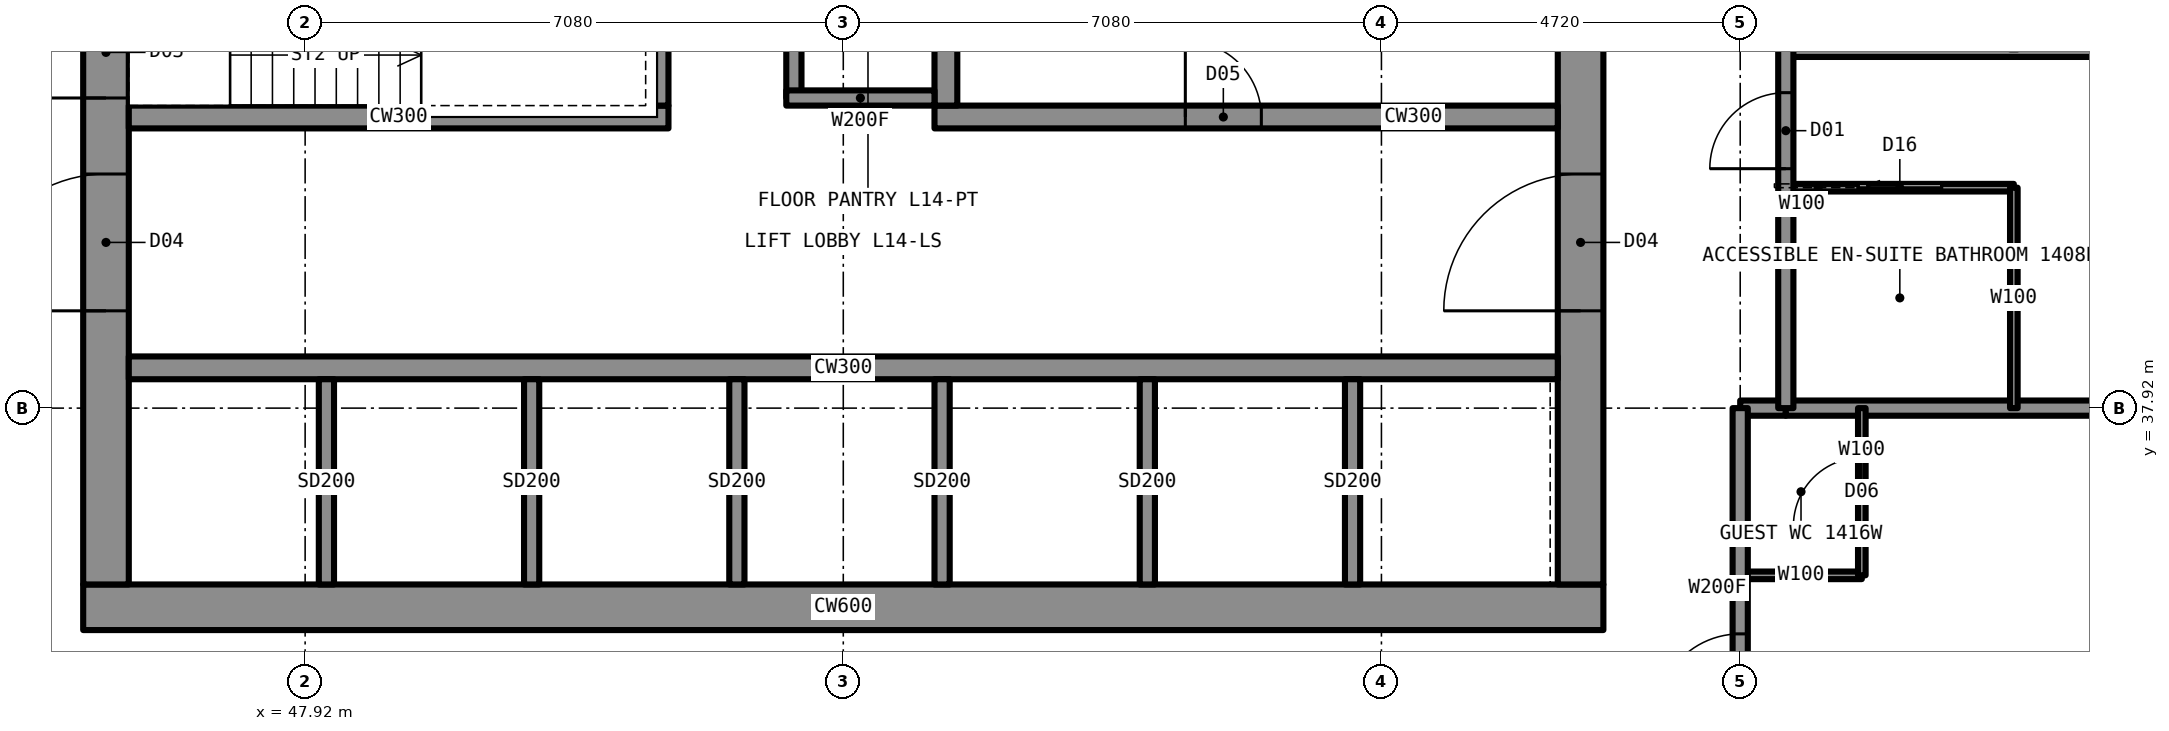
"""IFC4 building model, lengths in metres.
Left out: names, types, materials, properties, quantities, classifications, styles, units other than length and angle.
Written with IfcOpenShell. Run it as: python <this file> out.ifc"""

import sys

from ifc_helpers import new_model, si_unit, direction, frame, frame_2d, origin, place, context, subcontext, project, spatial, rectangle, extrude, element, fill, save


model = new_model("IFC4")
c1 = context("Model", 3, precision=1e-05, world=origin(), true_north=direction((0.0, 1.0)))
c2 = subcontext(c1, "Body", "Model", "MODEL_VIEW")
j1 = project(units=[si_unit("LENGTHUNIT", "METRE"), si_unit("PLANEANGLEUNIT", "RADIAN")], contexts=[c1])
p1 = place(None, origin())
s1 = spatial("IfcSite", under=j1, at=p1, CompositionType="ELEMENT")
p2 = place(p1, origin())
s2 = spatial("IfcBuilding", under=s1, at=p2, CompositionType="ELEMENT")
p3 = place(p2, frame((0.0, 0.0, 49.5)))
s3 = spatial("IfcBuildingStorey", under=s2, at=p3, CompositionType="ELEMENT", Elevation=49.5)
p4 = place(p3, frame((45.0, 35.3, 0.0), z_axis=(0.0, 0.0, 1.0), x_axis=(1.0, 0.0, 0.0)))
e1 = element("IfcWall", 1, at=p4, inside=s3, PredefinedType="SHEAR", context=c2, shape_type="SweptSolid", body=[
    extrude(rectangle(XDim=20.0, YDim=0.6, at=frame_2d((10.0, 0.0))), origin(), (0.0, 0.0, 1.0), 3.5),
])
p5 = place(p3, frame((64.7, 35.6, 0.0), z_axis=(0.0, 0.0, 1.0), x_axis=(0.0, 1.0, 0.0)))
e2 = element("IfcWall", 2, at=p5, inside=s3, PredefinedType="SHEAR", context=c2, shape_type="SweptSolid", body=[
    extrude(rectangle(XDim=18.8, YDim=0.6, at=frame_2d((9.4, 0.0))), origin(), (0.0, 0.0, 1.0), 3.5),
])
p6 = place(p5, frame((13.4, 0.0, 0.0)))
e3 = element("IfcOpeningElement", 3, at=p6, cuts=e2, PredefinedType="OPENING", context=c2, shape_type="SweptSolid", body=[
    extrude(rectangle(XDim=1.8, YDim=2.2, at=frame_2d((0.9, 1.1))), frame((0.0, 0.31, 0.0), z_axis=(0.0, -1.0, 0.0), x_axis=(1.0, 0.0, 0.0)), (0.0, 0.0, 1.0), 0.62),
])
p7 = place(p5, frame((3.6, 0.0, 0.0)))
e4 = element("IfcOpeningElement", 4, at=p7, cuts=e2, PredefinedType="OPENING", context=c2, shape_type="SweptSolid", body=[
    extrude(rectangle(XDim=1.8, YDim=2.2, at=frame_2d((0.9, 1.1))), frame((0.0, 0.31, 0.0), z_axis=(0.0, -1.0, 0.0), x_axis=(1.0, 0.0, 0.0)), (0.0, 0.0, 1.0), 0.62),
])
p8 = place(p3, frame((45.3, 35.6, 0.0), z_axis=(0.0, 0.0, 1.0), x_axis=(0.0, 1.0, 0.0)))
e5 = element("IfcWall", 5, at=p8, inside=s3, PredefinedType="SHEAR", context=c2, shape_type="SweptSolid", body=[
    extrude(rectangle(XDim=18.8, YDim=0.6, at=frame_2d((9.4, 0.0))), origin(), (0.0, 0.0, 1.0), 3.5),
])
p9 = place(p8, frame((13.4, 0.0, 0.0)))
e6 = element("IfcOpeningElement", 6, at=p9, cuts=e5, PredefinedType="OPENING", context=c2, shape_type="SweptSolid", body=[
    extrude(rectangle(XDim=1.8, YDim=2.2, at=frame_2d((0.9, 1.1))), frame((0.0, 0.31, 0.0), z_axis=(0.0, -1.0, 0.0), x_axis=(1.0, 0.0, 0.0)), (0.0, 0.0, 1.0), 0.62),
])
p10 = place(p8, frame((3.6, 0.0, 0.0)))
e7 = element("IfcOpeningElement", 7, at=p10, cuts=e5, PredefinedType="OPENING", context=c2, shape_type="SweptSolid", body=[
    extrude(rectangle(XDim=1.8, YDim=2.2, at=frame_2d((0.9, 1.1))), frame((0.0, 0.31, 0.0), z_axis=(0.0, -1.0, 0.0), x_axis=(1.0, 0.0, 0.0)), (0.0, 0.0, 1.0), 0.62),
])
p11 = place(p8, frame((6.4, 0.0, 0.0)))
e8 = element("IfcOpeningElement", 8, at=p11, cuts=e5, PredefinedType="OPENING", context=c2, shape_type="SweptSolid", body=[
    extrude(rectangle(XDim=1.2, YDim=2.2, at=frame_2d((0.6, 1.1))), frame((0.0, 0.31, 0.0), z_axis=(0.0, -1.0, 0.0), x_axis=(1.0, 0.0, 0.0)), (0.0, 0.0, 1.0), 0.62),
])
p12 = place(p3, frame((45.6, 38.45, 0.0), z_axis=(0.0, 0.0, 1.0), x_axis=(1.0, 0.0, 0.0)))
e9 = element("IfcWall", 9, at=p12, inside=s3, PredefinedType="SHEAR", context=c2, shape_type="SweptSolid", body=[
    extrude(rectangle(XDim=18.8, YDim=0.3, at=frame_2d((9.4, 0.0))), origin(), (0.0, 0.0, 1.0), 3.5),
])
p13 = place(p3, frame((45.6, 41.75, 0.0), z_axis=(0.0, 0.0, 1.0), x_axis=(1.0, 0.0, 0.0)))
e10 = element("IfcWall", 10, at=p13, inside=s3, PredefinedType="SHEAR", context=c2, shape_type="SweptSolid", body=[
    extrude(rectangle(XDim=7.1, YDim=0.3, at=frame_2d((3.55, 0.0))), origin(), (0.0, 0.0, 1.0), 3.5),
])
p14 = place(p3, frame((56.2, 41.75, 0.0), z_axis=(0.0, 0.0, 1.0), x_axis=(1.0, 0.0, 0.0)))
e11 = element("IfcWall", 11, at=p14, inside=s3, PredefinedType="SHEAR", context=c2, shape_type="SweptSolid", body=[
    extrude(rectangle(XDim=8.2, YDim=0.3, at=frame_2d((4.1, 0.0))), origin(), (0.0, 0.0, 1.0), 3.5),
])
p15 = place(p14, frame((3.3, 0.0, 0.0)))
e12 = element("IfcOpeningElement", 12, at=p15, cuts=e11, PredefinedType="OPENING", context=c2, shape_type="SweptSolid", body=[
    extrude(rectangle(XDim=1.0, YDim=2.1, at=frame_2d((0.5, 1.05))), frame((0.0, 0.16, 0.0), z_axis=(0.0, -1.0, 0.0), x_axis=(1.0, 0.0, 0.0)), (0.0, 0.0, 1.0), 0.32),
])
p16 = place(p3, frame((52.55, 41.9, 0.0), z_axis=(0.0, 0.0, 1.0), x_axis=(0.0, 1.0, 0.0)))
e13 = element("IfcWall", 13, at=p16, inside=s3, PredefinedType="SHEAR", context=c2, shape_type="SweptSolid", body=[
    extrude(rectangle(XDim=6.2, YDim=0.3, at=frame_2d((3.1, 0.0))), origin(), (0.0, 0.0, 1.0), 3.5),
])
p17 = place(p16, frame((4.125, 0.0, 0.0)))
e14 = element("IfcOpeningElement", 14, at=p17, cuts=e13, PredefinedType="OPENING", context=c2, shape_type="SweptSolid", body=[
    extrude(rectangle(XDim=1.2, YDim=2.2, at=frame_2d((0.6, 1.1))), frame((0.0, 0.16, 0.0), z_axis=(0.0, -1.0, 0.0), x_axis=(1.0, 0.0, 0.0)), (0.0, 0.0, 1.0), 0.32),
])
p18 = place(p3, frame((56.35, 41.9, 0.0), z_axis=(0.0, 0.0, 1.0), x_axis=(0.0, 1.0, 0.0)))
e15 = element("IfcWall", 15, at=p18, inside=s3, PredefinedType="SHEAR", context=c2, shape_type="SweptSolid", body=[
    extrude(rectangle(XDim=9.5, YDim=0.3, at=frame_2d((4.75, 0.0))), origin(), (0.0, 0.0, 1.0), 3.5),
])
p19 = place(p18, frame((7.1, 0.0, 0.0)))
e16 = element("IfcOpeningElement", 16, at=p19, cuts=e15, PredefinedType="OPENING", context=c2, shape_type="SweptSolid", body=[
    extrude(rectangle(XDim=1.8, YDim=2.2, at=frame_2d((0.9, 1.1))), frame((0.0, 0.16, 0.0), z_axis=(0.0, -1.0, 0.0), x_axis=(1.0, 0.0, 0.0)), (0.0, 0.0, 1.0), 0.32),
])
p20 = place(p3, frame((67.4, 42.64, 0.0), z_axis=(0.0, 0.0, 1.0), x_axis=(1.0, 0.0, 0.0)))
e17 = element("IfcWall", 17, at=p20, inside=s3, PredefinedType="PARTITIONING", context=c2, shape_type="SweptSolid", body=[
    extrude(rectangle(XDim=9.3, YDim=0.2, at=frame_2d((4.65, 0.0))), origin(), (0.0, 0.0, 1.0), 2.723),
])
p21 = place(p3, frame((67.4, 40.82, 0.0), z_axis=(0.0, 0.0, 1.0), x_axis=(1.0, 0.0, 0.0)))
e18 = element("IfcWall", 18, at=p21, inside=s3, PredefinedType="PARTITIONING", context=c2, shape_type="SweptSolid", body=[
    extrude(rectangle(XDim=3.0, YDim=0.1, at=frame_2d((1.5, 0.0))), origin(), (0.0, 0.0, 1.0), 3.33),
])
p22 = place(p21, frame((0.95, 0.0, 0.0)))
e19 = element("IfcOpeningElement", 19, at=p22, cuts=e18, PredefinedType="OPENING", context=c2, shape_type="SweptSolid", body=[
    extrude(rectangle(XDim=1.1, YDim=2.1, at=frame_2d((0.55, 1.05))), frame((0.0, 0.06, 0.0), z_axis=(0.0, -1.0, 0.0), x_axis=(1.0, 0.0, 0.0)), (0.0, 0.0, 1.0), 0.12),
])
p23 = place(p3, frame((66.8, 37.92, 0.0), z_axis=(0.0, 0.0, 1.0), x_axis=(1.0, 0.0, 0.0)))
e20 = element("IfcWall", 20, at=p23, inside=s3, PredefinedType="PARTITIONING", context=c2, shape_type="SweptSolid", body=[
    extrude(rectangle(XDim=0.6, YDim=0.2, at=frame_2d((0.3, 0.0))), origin(), (0.0, 0.0, 1.0), 2.573),
])
p24 = place(p3, frame((67.4, 37.92, 0.0), z_axis=(0.0, 0.0, 1.0), x_axis=(1.0, 0.0, 0.0)))
e21 = element("IfcWall", 21, at=p24, inside=s3, PredefinedType="PARTITIONING", context=c2, shape_type="SweptSolid", body=[
    extrude(rectangle(XDim=9.3, YDim=0.2, at=frame_2d((4.65, 0.0))), origin(), (0.0, 0.0, 1.0), 2.573),
])
p25 = place(p3, frame((66.8, 35.72, 0.0), z_axis=(0.0, 0.0, 1.0), x_axis=(1.0, 0.0, 0.0)))
e22 = element("IfcWall", 22, at=p25, inside=s3, PredefinedType="PARTITIONING", context=c2, shape_type="SweptSolid", body=[
    extrude(rectangle(XDim=1.6, YDim=0.1, at=frame_2d((0.8, 0.0))), origin(), (0.0, 0.0, 1.0), 2.723),
])
p26 = place(p3, frame((66.8, 33.2, 0.0), z_axis=(0.0, 0.0, 1.0), x_axis=(0.0, 1.0, 0.0)))
e23 = element("IfcWall", 23, at=p26, inside=s3, PredefinedType="PARTITIONING", context=c2, shape_type="SweptSolid", body=[
    extrude(rectangle(XDim=4.72, YDim=0.2, at=frame_2d((2.36, 0.0))), origin(), (0.0, 0.0, 1.0), 3.33),
])
p27 = place(p26, frame((0.65, 0.0, 0.0)))
e24 = element("IfcOpeningElement", 24, at=p27, cuts=e23, PredefinedType="OPENING", context=c2, shape_type="SweptSolid", body=[
    extrude(rectangle(XDim=1.1, YDim=2.2, at=frame_2d((0.55, 1.1))), frame((0.0, 0.11, 0.0), z_axis=(0.0, -1.0, 0.0), x_axis=(1.0, 0.0, 0.0)), (0.0, 0.0, 1.0), 0.22),
])
p28 = place(p3, frame((67.4, 37.92, 0.0), z_axis=(0.0, 0.0, 1.0), x_axis=(0.0, 1.0, 0.0)))
e25 = element("IfcWall", 25, at=p28, inside=s3, PredefinedType="PARTITIONING", context=c2, shape_type="SweptSolid", body=[
    extrude(rectangle(XDim=14.16, YDim=0.2, at=frame_2d((7.08, 0.0))), origin(), (0.0, 0.0, 1.0), 3.33),
])
p29 = place(p28, frame((3.15, 0.0, 0.0)))
e26 = element("IfcOpeningElement", 26, at=p29, cuts=e25, PredefinedType="OPENING", context=c2, shape_type="SweptSolid", body=[
    extrude(rectangle(XDim=1.0, YDim=2.2, at=frame_2d((0.5, 1.1))), frame((0.0, 0.11, 0.0), z_axis=(0.0, -1.0, 0.0), x_axis=(1.0, 0.0, 0.0)), (0.0, 0.0, 1.0), 0.22),
])
p30 = place(p28, frame((7.72, 0.0, 0.0)))
e27 = element("IfcOpeningElement", 27, at=p30, cuts=e25, PredefinedType="OPENING", context=c2, shape_type="SweptSolid", body=[
    extrude(rectangle(XDim=1.0, YDim=2.2, at=frame_2d((0.5, 1.1))), frame((0.0, 0.11, 0.0), z_axis=(0.0, -1.0, 0.0), x_axis=(1.0, 0.0, 0.0)), (0.0, 0.0, 1.0), 0.22),
])
p31 = place(p3, frame((68.4, 35.72, 0.0), z_axis=(0.0, 0.0, 1.0), x_axis=(0.0, 1.0, 0.0)))
e28 = element("IfcWall", 28, at=p31, inside=s3, PredefinedType="PARTITIONING", context=c2, shape_type="SweptSolid", body=[
    extrude(rectangle(XDim=2.2, YDim=0.1, at=frame_2d((1.1, 0.0))), origin(), (0.0, 0.0, 1.0), 3.33),
])
p32 = place(p31, frame((0.65, 0.0, 0.0)))
e29 = element("IfcOpeningElement", 29, at=p32, cuts=e28, PredefinedType="OPENING", context=c2, shape_type="SweptSolid", body=[
    extrude(rectangle(XDim=0.9, YDim=2.1, at=frame_2d((0.45, 1.05))), frame((0.0, 0.06, 0.0), z_axis=(0.0, -1.0, 0.0), x_axis=(1.0, 0.0, 0.0)), (0.0, 0.0, 1.0), 0.12),
])
p33 = place(p3, frame((70.4, 37.92, 0.0), z_axis=(0.0, 0.0, 1.0), x_axis=(0.0, 1.0, 0.0)))
e30 = element("IfcWall", 30, at=p33, inside=s3, PredefinedType="PARTITIONING", context=c2, shape_type="SweptSolid", body=[
    extrude(rectangle(XDim=2.9, YDim=0.1, at=frame_2d((1.45, 0.0))), origin(), (0.0, 0.0, 1.0), 3.33),
])
p34 = place(p3, frame((54.65, 42.0, 0.0), z_axis=(0.0, 0.0, 1.0), x_axis=(0.0, 1.0, 0.0)))
e31 = element("IfcWall", 31, at=p34, inside=s3, PredefinedType="PARTITIONING", context=c2, shape_type="SweptSolid", body=[
    extrude(rectangle(XDim=1.3, YDim=0.2, at=frame_2d((0.65, 0.0))), origin(), (0.0, 0.0, 1.0), 3.33),
])
p35 = place(p34, frame((0.15, 0.0, 0.0)))
e32 = element("IfcOpeningElement", 32, at=p35, cuts=e31, PredefinedType="OPENING", context=c2, shape_type="SweptSolid", body=[
    extrude(rectangle(XDim=1.0, YDim=2.1, at=frame_2d((0.5, 1.05))), frame((0.0, 0.11, 0.0), z_axis=(0.0, -1.0, 0.0), x_axis=(1.0, 0.0, 0.0)), (0.0, 0.0, 1.0), 0.22),
])
p36 = place(p3, frame((54.55, 42.0, 0.0), z_axis=(0.0, 0.0, 1.0), x_axis=(1.0, 0.0, 0.0)))
e33 = element("IfcWall", 33, at=p36, inside=s3, PredefinedType="PARTITIONING", context=c2, shape_type="SweptSolid", body=[
    extrude(rectangle(XDim=1.65, YDim=0.2, at=frame_2d((0.825, 0.0))), origin(), (0.0, 0.0, 1.0), 3.33),
])
for number, where, z_axis, x_axis in (
    (34, (48.2, 35.6, 0.0), (0.0, 0.0, 1.0), (0.0, 1.0, 0.0)),
    (35, (50.9, 35.6, 0.0), (0.0, 0.0, 1.0), (0.0, 1.0, 0.0)),
    (36, (53.6, 35.6, 0.0), (0.0, 0.0, 1.0), (0.0, 1.0, 0.0)),
    (37, (56.3, 35.6, 0.0), (0.0, 0.0, 1.0), (0.0, 1.0, 0.0)),
    (38, (59.0, 35.6, 0.0), (0.0, 0.0, 1.0), (0.0, 1.0, 0.0)),
    (39, (61.7, 35.6, 0.0), (0.0, 0.0, 1.0), (0.0, 1.0, 0.0)),
):
    element("IfcWall", number, at=place(p3, frame(where, z_axis=z_axis, x_axis=x_axis)), inside=s3, PredefinedType="PARTITIONING", context=c2, shape_type="SweptSolid", body=[
        extrude(rectangle(XDim=2.7, YDim=0.2, at=frame_2d((1.35, 0.0))), origin(), (0.0, 0.0, 1.0), 3.33),
    ])
p37 = place(p29, origin())
e40 = element("IfcDoor", 40, at=p37, inside=s3, OperationType="SINGLE_SWING_LEFT", PredefinedType="DOOR", context=c2, shape_type="SweptSolid", body=[
    extrude(rectangle(XDim=1.0, YDim=2.2, at=frame_2d((0.5, 1.1))), frame((0.0, 0.025, 0.0), z_axis=(0.0, -1.0, 0.0), x_axis=(1.0, 0.0, 0.0)), (0.0, 0.0, 1.0), 0.05),
])
fill(e26, e40)
p38 = place(p22, origin())
e41 = element("IfcDoor", 41, at=p38, inside=s3, OperationType="SLIDING_TO_LEFT", PredefinedType="DOOR", context=c2, shape_type="SweptSolid", body=[
    extrude(rectangle(XDim=1.1, YDim=2.1, at=frame_2d((0.55, 1.05))), frame((0.0, 0.025, 0.0), z_axis=(0.0, -1.0, 0.0), x_axis=(1.0, 0.0, 0.0)), (0.0, 0.0, 1.0), 0.05),
])
fill(e19, e41)
p39 = place(p27, origin())
e42 = element("IfcDoor", 42, at=p39, inside=s3, OperationType="SINGLE_SWING_LEFT", PredefinedType="DOOR", context=c2, shape_type="SweptSolid", body=[
    extrude(rectangle(XDim=1.1, YDim=2.2, at=frame_2d((0.55, 1.1))), frame((0.0, 0.025, 0.0), z_axis=(0.0, -1.0, 0.0), x_axis=(1.0, 0.0, 0.0)), (0.0, 0.0, 1.0), 0.05),
])
fill(e24, e42)
p40 = place(p32, origin())
e43 = element("IfcDoor", 43, at=p40, inside=s3, OperationType="SINGLE_SWING_LEFT", PredefinedType="DOOR", context=c2, shape_type="SweptSolid", body=[
    extrude(rectangle(XDim=0.9, YDim=2.1, at=frame_2d((0.45, 1.05))), frame((0.0, 0.025, 0.0), z_axis=(0.0, -1.0, 0.0), x_axis=(1.0, 0.0, 0.0)), (0.0, 0.0, 1.0), 0.05),
])
fill(e29, e43)
p41 = place(p35, origin())
e44 = element("IfcDoor", 44, at=p41, inside=s3, OperationType="SINGLE_SWING_LEFT", PredefinedType="DOOR", context=c2, shape_type="SweptSolid", body=[
    extrude(rectangle(XDim=1.0, YDim=2.1, at=frame_2d((0.5, 1.05))), frame((0.0, 0.025, 0.0), z_axis=(0.0, -1.0, 0.0), x_axis=(1.0, 0.0, 0.0)), (0.0, 0.0, 1.0), 0.05),
])
fill(e32, e44)
p42 = place(p10, origin())
e45 = element("IfcDoor", 45, at=p42, inside=s3, OperationType="DOUBLE_DOOR_SINGLE_SWING", PredefinedType="DOOR", context=c2, shape_type="SweptSolid", body=[
    extrude(rectangle(XDim=1.8, YDim=2.2, at=frame_2d((0.9, 1.1))), frame((0.0, 0.025, 0.0), z_axis=(0.0, -1.0, 0.0), x_axis=(1.0, 0.0, 0.0)), (0.0, 0.0, 1.0), 0.05),
])
fill(e7, e45)
p43 = place(p7, origin())
e46 = element("IfcDoor", 46, at=p43, inside=s3, OperationType="DOUBLE_DOOR_SINGLE_SWING", PredefinedType="DOOR", context=c2, shape_type="SweptSolid", body=[
    extrude(rectangle(XDim=1.8, YDim=2.2, at=frame_2d((0.9, 1.1))), frame((0.0, 0.025, 0.0), z_axis=(0.0, -1.0, 0.0), x_axis=(1.0, 0.0, 0.0)), (0.0, 0.0, 1.0), 0.05),
])
fill(e4, e46)
p44 = place(p11, origin())
e47 = element("IfcDoor", 47, at=p44, inside=s3, OperationType="SINGLE_SWING_LEFT", PredefinedType="DOOR", context=c2, shape_type="SweptSolid", body=[
    extrude(rectangle(XDim=1.2, YDim=2.2, at=frame_2d((0.6, 1.1))), frame((0.0, 0.025, 0.0), z_axis=(0.0, -1.0, 0.0), x_axis=(1.0, 0.0, 0.0)), (0.0, 0.0, 1.0), 0.05),
])
fill(e8, e47)
p45 = place(p15, origin())
e48 = element("IfcDoor", 48, at=p45, inside=s3, OperationType="SINGLE_SWING_LEFT", PredefinedType="DOOR", context=c2, shape_type="SweptSolid", body=[
    extrude(rectangle(XDim=1.0, YDim=2.1, at=frame_2d((0.5, 1.05))), frame((0.0, 0.025, 0.0), z_axis=(0.0, -1.0, 0.0), x_axis=(1.0, 0.0, 0.0)), (0.0, 0.0, 1.0), 0.05),
])
fill(e12, e48)
save(model, sys.argv[1])
